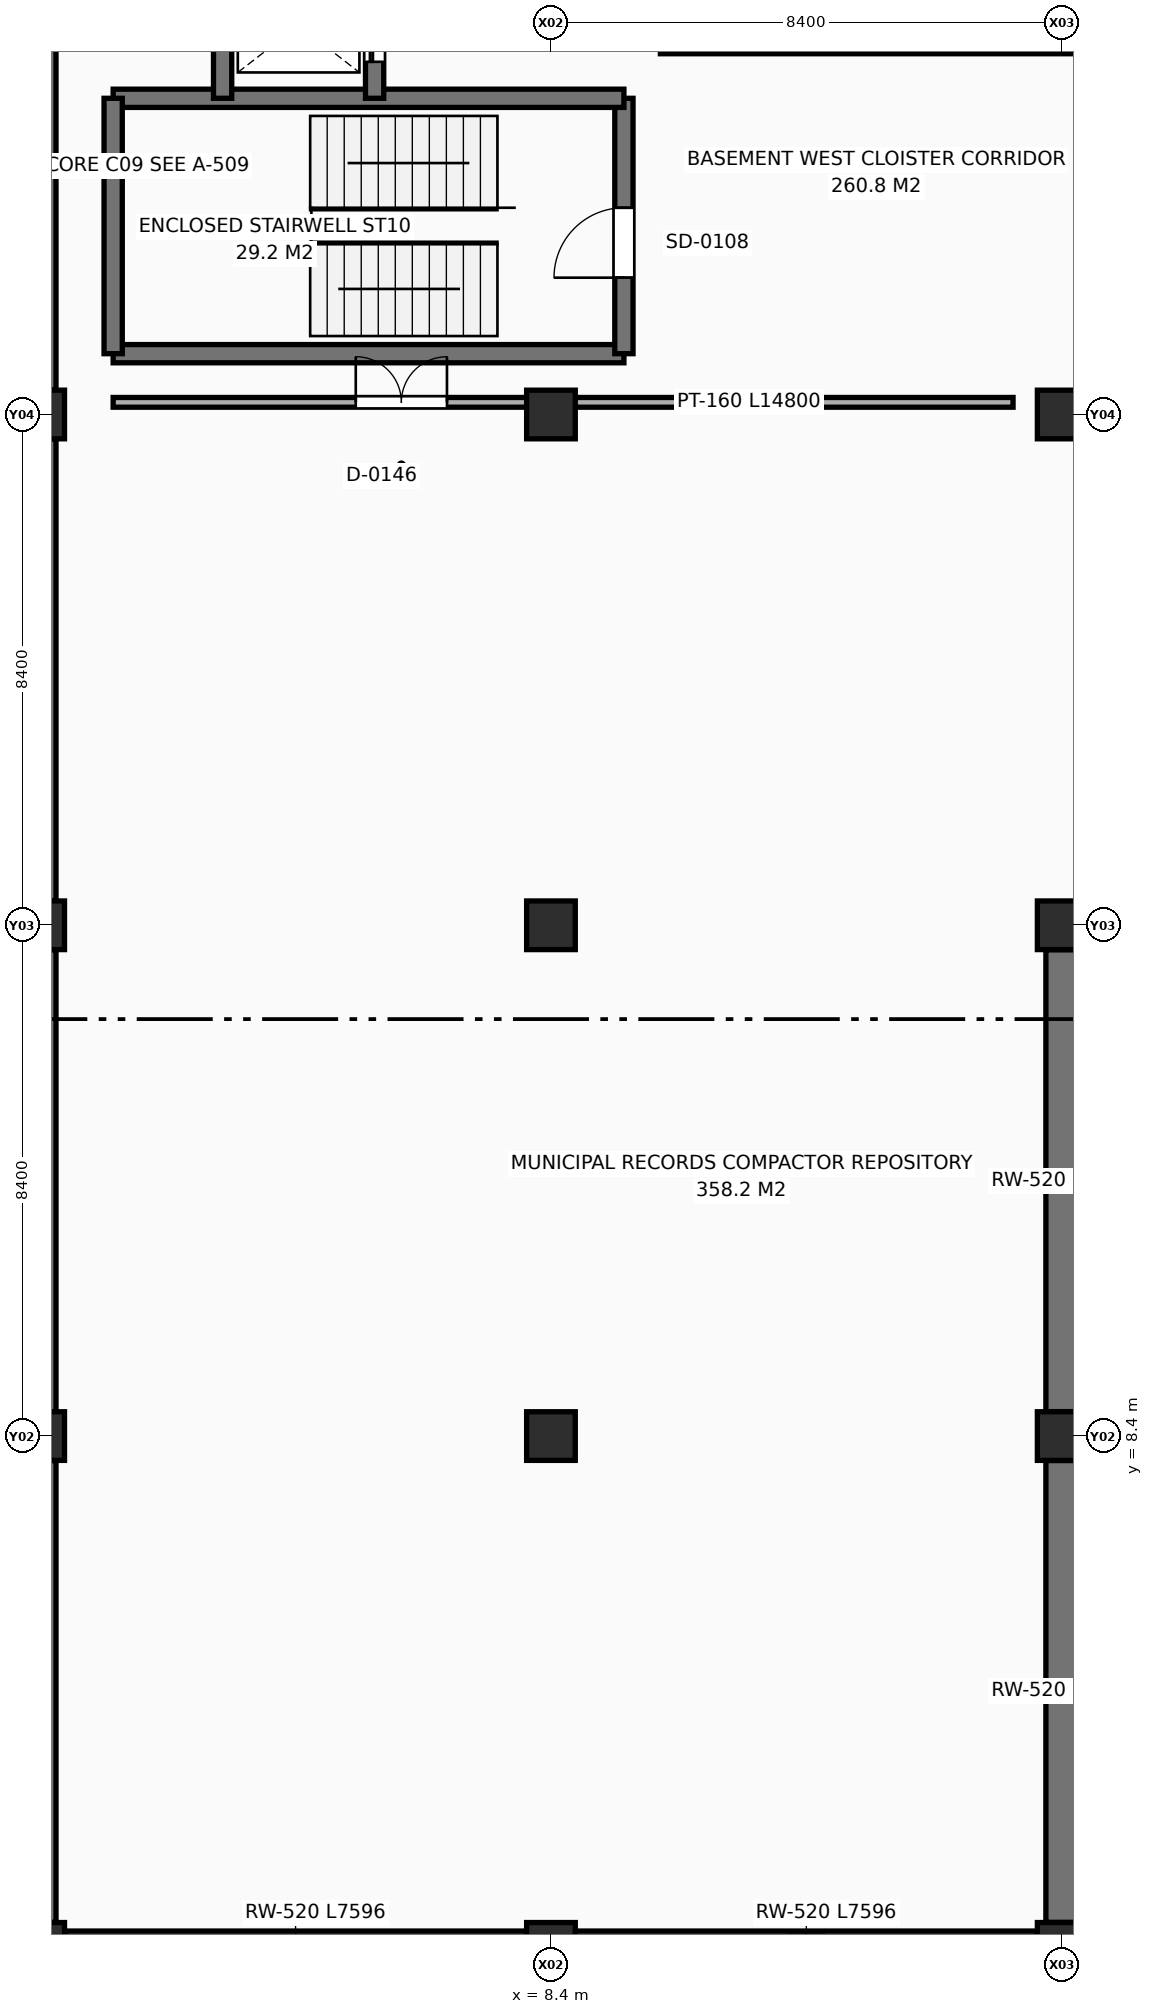
"""IFC4 building model, lengths in metres.
Left out: names, types, materials, properties, quantities, classifications, styles, units other than length and angle.
Written with IfcOpenShell. Run it as: python <this file> out.ifc"""

import sys

from ifc_helpers import new_model, si_unit, direction, frame, frame_2d, origin, origin_2d, place, context, subcontext, project, spatial, rectangle, extrude, element, fill, save


model = new_model("IFC4")
c1 = context("Model", 3, precision=1e-05, world=origin(), true_north=direction((0.0, 1.0)))
c2 = subcontext(c1, "Body", "Model", "MODEL_VIEW")
j1 = project(units=[si_unit("LENGTHUNIT", "METRE"), si_unit("PLANEANGLEUNIT", "RADIAN")], contexts=[c1])
p1 = place(None, origin())
s1 = spatial("IfcSite", under=j1, at=p1, CompositionType="ELEMENT")
p2 = place(p1, origin())
s2 = spatial("IfcBuilding", under=s1, at=p2, CompositionType="ELEMENT")
p3 = place(p2, frame((0.0, 0.0, -4.2)))
s3 = spatial("IfcBuildingStorey", under=s2, at=p3, CompositionType="ELEMENT", Elevation=-4.2)
for number, where, z_axis, x_axis in (
    (1, (0.0, 0.0, 0.0), (0.0, 0.0, 1.0), (1.0, 0.0, 0.0)),
    (2, (0.0, 8.4, 0.0), (0.0, 0.0, 1.0), (1.0, 0.0, 0.0)),
    (3, (0.0, 16.8, 0.0), (0.0, 0.0, 1.0), (1.0, 0.0, 0.0)),
    (4, (0.0, 25.2, 0.0), (0.0, 0.0, 1.0), (1.0, 0.0, 0.0)),
    (5, (8.4, 0.0, 0.0), (0.0, 0.0, 1.0), (1.0, 0.0, 0.0)),
    (6, (8.4, 8.4, 0.0), (0.0, 0.0, 1.0), (1.0, 0.0, 0.0)),
    (7, (8.4, 16.8, 0.0), (0.0, 0.0, 1.0), (1.0, 0.0, 0.0)),
    (8, (8.4, 25.2, 0.0), (0.0, 0.0, 1.0), (1.0, 0.0, 0.0)),
    (9, (16.8, 0.0, 0.0), (0.0, 0.0, 1.0), (1.0, 0.0, 0.0)),
    (10, (16.8, 8.4, 0.0), (0.0, 0.0, 1.0), (1.0, 0.0, 0.0)),
    (11, (16.8, 16.8, 0.0), (0.0, 0.0, 1.0), (1.0, 0.0, 0.0)),
    (12, (16.8, 25.2, 0.0), (0.0, 0.0, 1.0), (1.0, 0.0, 0.0)),
):
    element("IfcColumn", number, at=place(p3, frame(where, z_axis=z_axis, x_axis=x_axis)), inside=s3, PredefinedType="COLUMN", context=c2, shape_type="SweptSolid", body=[
        extrude(rectangle(XDim=0.8, YDim=0.8, at=origin_2d()), origin(), (0.0, 0.0, 1.0), 4.2),
    ])
for number, where, z_axis, x_axis in (
    (13, (0.402, 0.0, 0.0), (0.0, 0.0, 1.0), (1.0, 0.0, 0.0)),
    (14, (8.802, 0.0, 0.0), (0.0, 0.0, 1.0), (1.0, 0.0, 0.0)),
    (15, (16.8, 0.402, 0.0), (0.0, 0.0, 1.0), (0.0, 1.0, 0.0)),
    (16, (16.8, 8.802, 0.0), (0.0, 0.0, 1.0), (0.0, 1.0, 0.0)),
    (17, (0.0, 33.198, 0.0), (0.0, 0.0, 1.0), (0.0, -1.0, 0.0)),
):
    element("IfcWall", number, at=place(p3, frame(where, z_axis=z_axis, x_axis=x_axis)), inside=s3, PredefinedType="SOLIDWALL", context=c2, shape_type="SweptSolid", body=[
        extrude(rectangle(XDim=7.596, YDim=0.52, at=frame_2d((3.798, 0.0))), origin(), (0.0, 0.0, 1.0), 3.94),
    ])
p4 = place(p3, frame((0.0, 24.798, 0.0), z_axis=(0.0, 0.0, 1.0), x_axis=(0.0, -1.0, 0.0)))
e18 = element("IfcWall", 18, at=p4, inside=s3, PredefinedType="SOLIDWALL", context=c2, shape_type="SweptSolid", body=[
    extrude(rectangle(XDim=7.596, YDim=0.52, at=frame_2d((3.798, 0.0))), origin(), (0.0, 0.0, 1.0), 3.94),
])
for number, where, z_axis, x_axis in (
    (19, (0.0, 16.398, 0.0), (0.0, 0.0, 1.0), (0.0, -1.0, 0.0)),
    (20, (0.0, 7.998, 0.0), (0.0, 0.0, 1.0), (0.0, -1.0, 0.0)),
):
    element("IfcWall", number, at=place(p3, frame(where, z_axis=z_axis, x_axis=x_axis)), inside=s3, PredefinedType="SOLIDWALL", context=c2, shape_type="SweptSolid", body=[
        extrude(rectangle(XDim=7.596, YDim=0.52, at=frame_2d((3.798, 0.0))), origin(), (0.0, 0.0, 1.0), 3.94),
    ])
p5 = place(p3, frame((1.2, 26.2, 0.0), z_axis=(0.0, 0.0, 1.0), x_axis=(1.0, 0.0, 0.0)))
e21 = element("IfcWall", 21, at=p5, inside=s3, PredefinedType="SHEAR", context=c2, shape_type="SweptSolid", body=[
    extrude(rectangle(XDim=8.4, YDim=0.3, at=frame_2d((4.2, 0.0))), origin(), (0.0, 0.0, 1.0), 3.92),
])
p6 = place(p3, frame((9.6, 26.2, 0.0), z_axis=(0.0, 0.0, 1.0), x_axis=(0.0, 1.0, 0.0)))
e22 = element("IfcWall", 22, at=p6, inside=s3, PredefinedType="SHEAR", context=c2, shape_type="SweptSolid", body=[
    extrude(rectangle(XDim=4.2, YDim=0.3, at=frame_2d((2.1, 0.0))), origin(), (0.0, 0.0, 1.0), 3.92),
])
p7 = place(p6, frame((1.25, 0.0, 0.0)))
e23 = element("IfcOpeningElement", 23, at=p7, cuts=e22, PredefinedType="OPENING", context=c2, shape_type="SweptSolid", body=[
    extrude(rectangle(XDim=1.15, YDim=2.2, at=frame_2d((0.575, 1.1))), frame((0.0, 0.16, 0.0), z_axis=(0.0, -1.0, 0.0), x_axis=(1.0, 0.0, 0.0)), (0.0, 0.0, 1.0), 0.32),
])
p8 = place(p3, frame((9.6, 30.4, 0.0), z_axis=(0.0, 0.0, 1.0), x_axis=(-1.0, 0.0, 0.0)))
e24 = element("IfcWall", 24, at=p8, inside=s3, PredefinedType="SHEAR", context=c2, shape_type="SweptSolid", body=[
    extrude(rectangle(XDim=8.4, YDim=0.3, at=frame_2d((4.2, 0.0))), origin(), (0.0, 0.0, 1.0), 3.92),
])
p9 = place(p3, frame((1.2, 30.4, 0.0), z_axis=(0.0, 0.0, 1.0), x_axis=(0.0, -1.0, 0.0)))
e25 = element("IfcWall", 25, at=p9, inside=s3, PredefinedType="SHEAR", context=c2, shape_type="SweptSolid", body=[
    extrude(rectangle(XDim=4.2, YDim=0.3, at=frame_2d((2.1, 0.0))), origin(), (0.0, 0.0, 1.0), 3.92),
])
p10 = place(p3, frame((3.0, 32.8, 0.0), z_axis=(0.0, 0.0, 1.0), x_axis=(0.0, -1.0, 0.0)))
e26 = element("IfcWall", 26, at=p10, inside=s3, PredefinedType="SHEAR", context=c2, shape_type="SweptSolid", body=[
    extrude(rectangle(XDim=2.4, YDim=0.3, at=frame_2d((1.2, 0.0))), origin(), (0.0, 0.0, 1.0), 3.92),
])
p11 = place(p3, frame((5.5, 30.4, 0.0), z_axis=(0.0, 0.0, 1.0), x_axis=(0.0, 1.0, 0.0)))
e27 = element("IfcWall", 27, at=p11, inside=s3, PredefinedType="SHEAR", context=c2, shape_type="SweptSolid", body=[
    extrude(rectangle(XDim=2.4, YDim=0.3, at=frame_2d((1.2, 0.0))), origin(), (0.0, 0.0, 1.0), 3.92),
])
p12 = place(p11, frame((0.6, 0.0, 0.0)))
e28 = element("IfcOpeningElement", 28, at=p12, cuts=e27, PredefinedType="OPENING", context=c2, shape_type="SweptSolid", body=[
    extrude(rectangle(XDim=1.2, YDim=2.25, at=frame_2d((0.6, 1.125))), frame((0.0, 0.16, 0.0), z_axis=(0.0, -1.0, 0.0), x_axis=(1.0, 0.0, 0.0)), (0.0, 0.0, 1.0), 0.32),
])
p13 = place(p3, frame((1.2, 25.4, 0.0), z_axis=(0.0, 0.0, 1.0), x_axis=(1.0, 0.0, 0.0)))
e29 = element("IfcWall", 29, at=p13, inside=s3, PredefinedType="PARTITIONING", context=c2, shape_type="SweptSolid", body=[
    extrude(rectangle(XDim=14.8, YDim=0.16, at=frame_2d((7.4, 0.0))), origin(), (0.0, 0.0, 1.0), 3.29),
])
p14 = place(p13, frame((3.99, 0.0, 0.0)))
e30 = element("IfcOpeningElement", 30, at=p14, cuts=e29, PredefinedType="OPENING", context=c2, shape_type="SweptSolid", body=[
    extrude(rectangle(XDim=1.5, YDim=2.35, at=frame_2d((0.75, 1.175))), frame((0.0, 0.09, 0.0), z_axis=(0.0, -1.0, 0.0), x_axis=(1.0, 0.0, 0.0)), (0.0, 0.0, 1.0), 0.18),
])
p15 = place(p3, frame((10.2, 31.2, 0.0), z_axis=(0.0, 0.0, 1.0), x_axis=(1.0, 0.0, 0.0)))
e31 = element("IfcWall", 31, at=p15, inside=s3, PredefinedType="PARTITIONING", context=c2, shape_type="SweptSolid", body=[
    extrude(rectangle(XDim=23.0, YDim=0.135, at=frame_2d((11.5, 0.0))), origin(), (0.0, 0.0, 1.0), 3.86),
])
p16 = place(p15, frame((10.9, 0.0, 0.0)))
e32 = element("IfcOpeningElement", 32, at=p16, cuts=e31, PredefinedType="OPENING", context=c2, shape_type="SweptSolid", body=[
    extrude(rectangle(XDim=1.2, YDim=2.2, at=frame_2d((0.6, 1.1))), frame((0.0, 0.077, 0.0), z_axis=(0.0, -1.0, 0.0), x_axis=(1.0, 0.0, 0.0)), (0.0, 0.0, 1.0), 0.155),
])
p17 = place(p7, origin())
e33 = element("IfcDoor", 33, at=p17, inside=s3, OperationType="SINGLE_SWING_LEFT", PredefinedType="DOOR", context=c2, shape_type="SweptSolid", body=[
    extrude(rectangle(XDim=1.15, YDim=2.2, at=frame_2d((0.575, 1.1))), frame((0.0, 0.025, 0.0), z_axis=(0.0, -1.0, 0.0), x_axis=(1.0, 0.0, 0.0)), (0.0, 0.0, 1.0), 0.05),
])
fill(e23, e33)
p18 = place(p12, origin())
e34 = element("IfcDoor", 34, at=p18, inside=s3, OperationType="SLIDING_TO_LEFT", PredefinedType="DOOR", context=c2, shape_type="SweptSolid", body=[
    extrude(rectangle(XDim=1.2, YDim=2.25, at=frame_2d((0.6, 1.125))), frame((0.0, 0.025, 0.0), z_axis=(0.0, -1.0, 0.0), x_axis=(1.0, 0.0, 0.0)), (0.0, 0.0, 1.0), 0.05),
])
fill(e28, e34)
p19 = place(p14, origin())
e35 = element("IfcDoor", 35, at=p19, inside=s3, OperationType="DOUBLE_DOOR_SINGLE_SWING", PredefinedType="DOOR", context=c2, shape_type="SweptSolid", body=[
    extrude(rectangle(XDim=1.5, YDim=2.35, at=frame_2d((0.75, 1.175))), frame((0.0, 0.025, 0.0), z_axis=(0.0, -1.0, 0.0), x_axis=(1.0, 0.0, 0.0)), (0.0, 0.0, 1.0), 0.05),
])
fill(e30, e35)
save(model, sys.argv[1])
